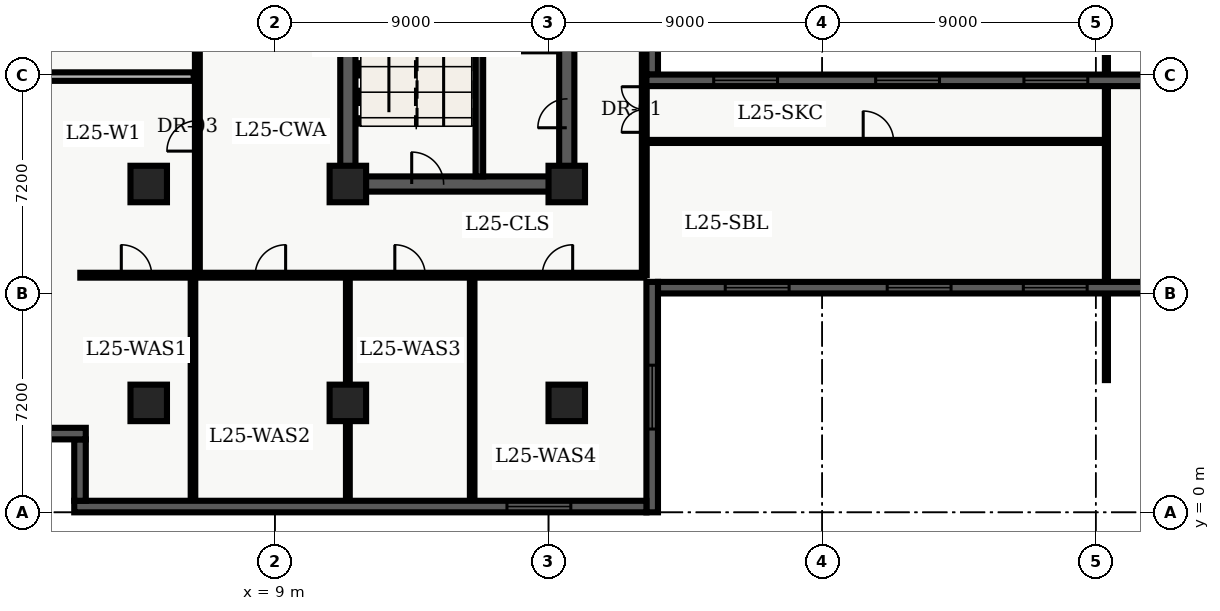
"""IFC4 building model, lengths in metres.
Left out: names, types, materials, properties, quantities, classifications, styles, units other than length and angle.
Written with IfcOpenShell. Run it as: python <this file> out.ifc"""

import sys

from ifc_helpers import new_model, entity, si_unit, converted_unit, direction, frame, origin_with_axes, origin_2d_with_axis, place, context, subcontext, project, spatial, polyline, rectangle, outline, extrude, element, fill, save


model = new_model("IFC4")
c1 = context("Model", 3, precision=1e-05, world=origin_with_axes(), true_north=direction((0.0, 1.0)))
c2 = subcontext(c1, "Body", "Model", "MODEL_VIEW")
j1 = project(units=[si_unit("LENGTHUNIT", "METRE"), converted_unit("PLANEANGLEUNIT", "DEGREE", entity("IfcPlaneAngleMeasure", 0.017), si_unit("PLANEANGLEUNIT", "RADIAN"), dimensions=[0, 0, 0, 0, 0, 0, 0])], contexts=[c1])
p1 = place(None, origin_with_axes())
s1 = spatial("IfcSite", under=j1, at=p1, CompositionType="ELEMENT")
p2 = place(p1, origin_with_axes())
s2 = spatial("IfcBuilding", under=s1, at=p2, CompositionType="ELEMENT")
p3 = place(p2, frame((0.0, 0.0, 104.7), z_axis=(0.0, 0.0, 1.0), x_axis=(1.0, 0.0, 0.0)))
s3 = spatial("IfcBuildingStorey", under=s2, at=p3, CompositionType="ELEMENT", Elevation=104.7)
p4 = place(p3, frame((11.4, 10.8, 0.0), z_axis=(0.0, 0.0, 1.0), x_axis=(0.0, 1.0, 0.0)))
e1 = element("IfcWall", 1, at=p4, inside=s3, PredefinedType="SHEAR", context=c2, shape_type="SweptSolid", body=[
    extrude(outline(polyline([(0.0, -0.25), (27.0, -0.25), (27.0, 0.25), (0.0, 0.25), (0.0, -0.25)])), origin_with_axes(), (0.0, 0.0, 1.0), 3.66),
])
p5 = place(p3, frame((11.4, 10.8, 0.0), z_axis=(0.0, 0.0, 1.0), x_axis=(1.0, 0.0, 0.0)))
e2 = element("IfcWall", 2, at=p5, inside=s3, PredefinedType="SHEAR", context=c2, shape_type="SweptSolid", body=[
    extrude(outline(polyline([(0.0, -0.25), (7.2, -0.25), (7.2, 0.25), (0.0, 0.25), (0.0, -0.25)])), origin_with_axes(), (0.0, 0.0, 1.0), 3.66),
])
p6 = place(p5, frame((2.625, 0.0, 0.0), z_axis=(0.0, 0.0, 1.0), x_axis=(1.0, 0.0, 0.0)))
e3 = element("IfcOpeningElement", 3, at=p6, cuts=e2, PredefinedType="OPENING", context=c2, shape_type="SweptSolid", body=[
    extrude(rectangle(XDim=1.05, YDim=0.52, at=origin_2d_with_axis()), origin_with_axes(), (0.0, 0.0, 1.0), 2.15),
])
p7 = place(p3, frame((18.6, 10.8, 0.0), z_axis=(0.0, 0.0, 1.0), x_axis=(0.0, 1.0, 0.0)))
e4 = element("IfcWall", 4, at=p7, inside=s3, PredefinedType="SHEAR", context=c2, shape_type="SweptSolid", body=[
    extrude(outline(polyline([(0.0, -0.25), (13.5, -0.25), (13.5, 0.25), (0.0, 0.25), (0.0, -0.25)])), origin_with_axes(), (0.0, 0.0, 1.0), 3.66),
])
p8 = place(p7, frame((11.125, 0.0, 0.0), z_axis=(0.0, 0.0, 1.0), x_axis=(1.0, 0.0, 0.0)))
e5 = element("IfcOpeningElement", 5, at=p8, cuts=e4, PredefinedType="OPENING", context=c2, shape_type="SweptSolid", body=[
    extrude(rectangle(XDim=1.05, YDim=0.52, at=origin_2d_with_axis()), origin_with_axes(), (0.0, 0.0, 1.0), 2.15),
])
p9 = place(p7, frame((2.325, 0.0, 0.0), z_axis=(0.0, 0.0, 1.0), x_axis=(1.0, 0.0, 0.0)))
e6 = element("IfcOpeningElement", 6, at=p9, cuts=e4, PredefinedType="OPENING", context=c2, shape_type="SweptSolid", body=[
    extrude(rectangle(XDim=0.95, YDim=0.52, at=origin_2d_with_axis()), origin_with_axes(), (0.0, 0.0, 1.0), 2.15),
])
p10 = place(p3, frame((15.725, 11.05, 0.0), z_axis=(0.0, 0.0, 1.0), x_axis=(0.0, 1.0, 0.0)))
e7 = element("IfcWall", 7, at=p10, inside=s3, PredefinedType="SHEAR", context=c2, shape_type="SweptSolid", body=[
    extrude(outline(polyline([(0.0, -0.125), (8.65, -0.125), (8.65, 0.125), (0.0, 0.125), (0.0, -0.125)])), origin_with_axes(), (0.0, 0.0, 1.0), 3.66),
])
for number, where, z_axis, x_axis in (
    (8, (11.4, 3.6, 0.0), (0.0, 0.0, 1.0), (1.0, 0.0, 0.0)),
    (9, (11.4, 10.8, 0.0), (0.0, 0.0, 1.0), (1.0, 0.0, 0.0)),
    (10, (18.6, 3.6, 0.0), (0.0, 0.0, 1.0), (1.0, 0.0, 0.0)),
    (11, (18.6, 10.8, 0.0), (0.0, 0.0, 1.0), (1.0, 0.0, 0.0)),
    (12, (4.85, 3.6, 0.0), (0.0, 0.0, 1.0), (1.0, 0.0, 0.0)),
    (13, (4.85, 10.8, 0.0), (0.0, 0.0, 1.0), (1.0, 0.0, 0.0)),
):
    element("IfcColumn", number, at=place(p3, frame(where, z_axis=z_axis, x_axis=x_axis)), inside=s3, PredefinedType="COLUMN", context=c2, shape_type="SweptSolid", body=[
        extrude(rectangle(XDim=1.2, YDim=1.2, at=origin_2d_with_axis()), origin_with_axes(), (0.0, 0.0, 1.0), 3.9),
    ])
p11 = place(p3, frame((2.6, 7.8, 0.0), z_axis=(0.0, 0.0, 1.0), x_axis=(1.0, 0.0, 0.0)))
e14 = element("IfcWall", 14, at=p11, inside=s3, PredefinedType="PARTITIONING", context=c2, shape_type="SweptSolid", body=[
    extrude(outline(polyline([(0.0, -0.08), (18.55, -0.08), (18.55, 0.08), (0.0, 0.08), (0.0, -0.08)])), origin_with_axes(), (0.0, 0.0, 1.0), 2.7),
])
p12 = place(p11, frame((1.848, 0.0, 0.0), z_axis=(0.0, 0.0, 1.0), x_axis=(1.0, 0.0, 0.0)))
e15 = element("IfcOpeningElement", 15, at=p12, cuts=e14, PredefinedType="OPENING", context=c2, shape_type="SweptSolid", body=[
    extrude(rectangle(XDim=1.0, YDim=0.18, at=origin_2d_with_axis()), origin_with_axes(), (0.0, 0.0, 1.0), 2.15),
])
p13 = place(p11, frame((6.253, 0.0, 0.0), z_axis=(0.0, 0.0, 1.0), x_axis=(1.0, 0.0, 0.0)))
e16 = element("IfcOpeningElement", 16, at=p13, cuts=e14, PredefinedType="OPENING", context=c2, shape_type="SweptSolid", body=[
    extrude(rectangle(XDim=1.0, YDim=0.18, at=origin_2d_with_axis()), origin_with_axes(), (0.0, 0.0, 1.0), 2.15),
])
p14 = place(p11, frame((10.845, 0.0, 0.0), z_axis=(0.0, 0.0, 1.0), x_axis=(1.0, 0.0, 0.0)))
e17 = element("IfcOpeningElement", 17, at=p14, cuts=e14, PredefinedType="OPENING", context=c2, shape_type="SweptSolid", body=[
    extrude(rectangle(XDim=1.0, YDim=0.18, at=origin_2d_with_axis()), origin_with_axes(), (0.0, 0.0, 1.0), 2.15),
])
p15 = place(p11, frame((15.694, 0.0, 0.0), z_axis=(0.0, 0.0, 1.0), x_axis=(1.0, 0.0, 0.0)))
e18 = element("IfcOpeningElement", 18, at=p15, cuts=e14, PredefinedType="OPENING", context=c2, shape_type="SweptSolid", body=[
    extrude(rectangle(XDim=1.0, YDim=0.18, at=origin_2d_with_axis()), origin_with_axes(), (0.0, 0.0, 1.0), 2.15),
])
p16 = place(p3, frame((21.15, 7.8, 0.0), z_axis=(0.0, 0.0, 1.0), x_axis=(0.0, 1.0, 0.0)))
e19 = element("IfcWall", 19, at=p16, inside=s3, PredefinedType="PARTITIONING", context=c2, shape_type="SweptSolid", body=[
    extrude(outline(polyline([(0.0, -0.08), (32.7, -0.08), (32.7, 0.08), (0.0, 0.08), (0.0, -0.08)])), origin_with_axes(), (0.0, 0.0, 1.0), 2.7),
])
p17 = place(p16, frame((5.45, 0.0, 0.0), z_axis=(0.0, 0.0, 1.0), x_axis=(1.0, 0.0, 0.0)))
e20 = element("IfcOpeningElement", 20, at=p17, cuts=e19, PredefinedType="OPENING", context=c2, shape_type="SweptSolid", body=[
    extrude(rectangle(XDim=1.5, YDim=0.18, at=origin_2d_with_axis()), origin_with_axes(), (0.0, 0.0, 1.0), 2.2),
])
p18 = place(p3, frame((6.45, 7.8, 0.0), z_axis=(0.0, 0.0, 1.0), x_axis=(0.0, 1.0, 0.0)))
e21 = element("IfcWall", 21, at=p18, inside=s3, PredefinedType="PARTITIONING", context=c2, shape_type="SweptSolid", body=[
    extrude(outline(polyline([(0.0, -0.08), (32.7, -0.08), (32.7, 0.08), (0.0, 0.08), (0.0, -0.08)])), origin_with_axes(), (0.0, 0.0, 1.0), 2.7),
])
p19 = place(p18, frame((4.582, 0.0, 0.0), z_axis=(0.0, 0.0, 1.0), x_axis=(1.0, 0.0, 0.0)))
e22 = element("IfcOpeningElement", 22, at=p19, cuts=e21, PredefinedType="OPENING", context=c2, shape_type="SweptSolid", body=[
    extrude(rectangle(XDim=1.0, YDim=0.18, at=origin_2d_with_axis()), origin_with_axes(), (0.0, 0.0, 1.0), 2.15),
])
p20 = place(p18, frame((10.304, 0.0, 0.0), z_axis=(0.0, 0.0, 1.0), x_axis=(1.0, 0.0, 0.0)))
e23 = element("IfcOpeningElement", 23, at=p20, cuts=e21, PredefinedType="OPENING", context=c2, shape_type="SweptSolid", body=[
    extrude(rectangle(XDim=1.0, YDim=0.18, at=origin_2d_with_axis()), origin_with_axes(), (0.0, 0.0, 1.0), 2.15),
])
p21 = place(p18, frame((18.512, 0.0, 0.0), z_axis=(0.0, 0.0, 1.0), x_axis=(1.0, 0.0, 0.0)))
e24 = element("IfcOpeningElement", 24, at=p21, cuts=e21, PredefinedType="OPENING", context=c2, shape_type="SweptSolid", body=[
    extrude(rectangle(XDim=1.0, YDim=0.18, at=origin_2d_with_axis()), origin_with_axes(), (0.0, 0.0, 1.0), 2.15),
])
p22 = place(p18, frame((25.142, 0.0, 0.0), z_axis=(0.0, 0.0, 1.0), x_axis=(1.0, 0.0, 0.0)))
e25 = element("IfcOpeningElement", 25, at=p22, cuts=e21, PredefinedType="OPENING", context=c2, shape_type="SweptSolid", body=[
    extrude(rectangle(XDim=1.0, YDim=0.18, at=origin_2d_with_axis()), origin_with_axes(), (0.0, 0.0, 1.0), 2.15),
])
p23 = place(p18, frame((31.602, 0.0, 0.0), z_axis=(0.0, 0.0, 1.0), x_axis=(1.0, 0.0, 0.0)))
e26 = element("IfcOpeningElement", 26, at=p23, cuts=e21, PredefinedType="OPENING", context=c2, shape_type="SweptSolid", body=[
    extrude(rectangle(XDim=1.0, YDim=0.18, at=origin_2d_with_axis()), origin_with_axes(), (0.0, 0.0, 1.0), 2.15),
])
p24 = place(p3, frame((0.375, 14.333, 0.0), z_axis=(0.0, 0.0, 1.0), x_axis=(1.0, 0.0, 0.0)))
e27 = element("IfcWall", 27, at=p24, inside=s3, PredefinedType="PARTITIONING", context=c2, shape_type="SweptSolid", body=[
    extrude(outline(polyline([(0.0, -0.14), (5.955, -0.14), (5.955, 0.14), (0.0, 0.14), (0.0, -0.14)])), origin_with_axes(), (0.0, 0.0, 1.0), 2.7),
])
p25 = place(p3, frame((6.306, 0.36, 0.0), z_axis=(0.0, 0.0, 1.0), x_axis=(0.0, 1.0, 0.0)))
e28 = element("IfcWall", 28, at=p25, inside=s3, PredefinedType="PARTITIONING", context=c2, shape_type="SweptSolid", body=[
    extrude(outline(polyline([(0.0, -0.075), (7.34, -0.075), (7.34, 0.075), (0.0, 0.075), (0.0, -0.075)])), origin_with_axes(), (0.0, 0.0, 1.0), 2.7),
])
p26 = place(p3, frame((11.4, 0.36, 0.0), z_axis=(0.0, 0.0, 1.0), x_axis=(0.0, 1.0, 0.0)))
e29 = element("IfcWall", 29, at=p26, inside=s3, PredefinedType="PARTITIONING", context=c2, shape_type="SweptSolid", body=[
    extrude(outline(polyline([(0.0, -0.062), (7.34, -0.062), (7.34, 0.062), (0.0, 0.062), (0.0, -0.062)])), origin_with_axes(), (0.0, 0.0, 1.0), 2.7),
])
p27 = place(p3, frame((15.489, 0.36, 0.0), z_axis=(0.0, 0.0, 1.0), x_axis=(0.0, 1.0, 0.0)))
e30 = element("IfcWall", 30, at=p27, inside=s3, PredefinedType="PARTITIONING", context=c2, shape_type="SweptSolid", body=[
    extrude(outline(polyline([(0.0, -0.075), (7.34, -0.075), (7.34, 0.075), (0.0, 0.075), (0.0, -0.075)])), origin_with_axes(), (0.0, 0.0, 1.0), 2.7),
])
p28 = place(p3, frame((21.15, 12.2, 0.0), z_axis=(0.0, 0.0, 1.0), x_axis=(1.0, 0.0, 0.0)))
e31 = element("IfcWall", 31, at=p28, inside=s3, PredefinedType="PARTITIONING", context=c2, shape_type="SweptSolid", body=[
    extrude(outline(polyline([(0.0, -0.05), (15.2, -0.05), (15.2, 0.05), (0.0, 0.05), (0.0, -0.05)])), origin_with_axes(), (0.0, 0.0, 1.0), 2.7),
])
p29 = place(p28, frame((7.7, 0.0, 0.0), z_axis=(0.0, 0.0, 1.0), x_axis=(1.0, 0.0, 0.0)))
e32 = element("IfcOpeningElement", 32, at=p29, cuts=e31, PredefinedType="OPENING", context=c2, shape_type="SweptSolid", body=[
    extrude(rectangle(XDim=1.0, YDim=0.12, at=origin_2d_with_axis()), origin_with_axes(), (0.0, 0.0, 1.0), 2.15),
])
p30 = place(p3, frame((36.35, 4.35, 0.0), z_axis=(0.0, 0.0, 1.0), x_axis=(0.0, 1.0, 0.0)))
e33 = element("IfcWall", 33, at=p30, inside=s3, PredefinedType="PARTITIONING", context=c2, shape_type="SweptSolid", body=[
    extrude(outline(polyline([(0.0, -0.05), (22.2, -0.05), (22.2, 0.05), (0.0, 0.05), (0.0, -0.05)])), origin_with_axes(), (0.0, 0.0, 1.0), 2.7),
])
p31 = place(p3, frame((38.78, 7.39, 0.0), z_axis=(0.0, 0.0, 1.0), x_axis=(-1.0, 0.0, 0.0)))
e34 = element("IfcWall", 34, at=p31, inside=s3, PredefinedType="SOLIDWALL", context=c2, shape_type="SweptSolid", body=[
    extrude(outline(polyline([(0.0, -0.19), (17.18, -0.19), (17.18, 0.19), (0.0, 0.19), (0.0, -0.19)])), origin_with_axes(), (0.0, 0.0, 1.0), 3.66),
])
p32 = place(p31, frame((4.113, 0.0, 0.45), z_axis=(0.0, 0.0, 1.0), x_axis=(1.0, 0.0, 0.0)))
e35 = element("IfcOpeningElement", 35, at=p32, cuts=e34, PredefinedType="OPENING", context=c2, shape_type="SweptSolid", body=[
    extrude(rectangle(XDim=2.1, YDim=0.4, at=origin_2d_with_axis()), origin_with_axes(), (0.0, 0.0, 1.0), 2.2),
])
p33 = place(p31, frame((8.59, 0.0, 0.45), z_axis=(0.0, 0.0, 1.0), x_axis=(1.0, 0.0, 0.0)))
e36 = element("IfcOpeningElement", 36, at=p33, cuts=e34, PredefinedType="OPENING", context=c2, shape_type="SweptSolid", body=[
    extrude(rectangle(XDim=2.1, YDim=0.4, at=origin_2d_with_axis()), origin_with_axes(), (0.0, 0.0, 1.0), 2.2),
])
p34 = place(p31, frame((13.917, 0.0, 0.45), z_axis=(0.0, 0.0, 1.0), x_axis=(1.0, 0.0, 0.0)))
e37 = element("IfcOpeningElement", 37, at=p34, cuts=e34, PredefinedType="OPENING", context=c2, shape_type="SweptSolid", body=[
    extrude(rectangle(XDim=2.1, YDim=0.4, at=origin_2d_with_axis()), origin_with_axes(), (0.0, 0.0, 1.0), 2.2),
])
p35 = place(p3, frame((21.41, 7.58, 0.0), z_axis=(0.0, 0.0, 1.0), x_axis=(0.0, -1.0, 0.0)))
e38 = element("IfcWall", 38, at=p35, inside=s3, PredefinedType="SOLIDWALL", context=c2, shape_type="SweptSolid", body=[
    extrude(outline(polyline([(0.0, -0.19), (7.58, -0.19), (7.58, 0.19), (0.0, 0.19), (0.0, -0.19)])), origin_with_axes(), (0.0, 0.0, 1.0), 3.66),
])
p36 = place(p35, frame((3.79, 0.0, 0.45), z_axis=(0.0, 0.0, 1.0), x_axis=(1.0, 0.0, 0.0)))
e39 = element("IfcOpeningElement", 39, at=p36, cuts=e38, PredefinedType="OPENING", context=c2, shape_type="SweptSolid", body=[
    extrude(rectangle(XDim=2.1, YDim=0.4, at=origin_2d_with_axis()), origin_with_axes(), (0.0, 0.0, 1.0), 2.2),
])
p37 = place(p3, frame((21.22, 0.19, 0.0), z_axis=(0.0, 0.0, 1.0), x_axis=(-1.0, 0.0, 0.0)))
e40 = element("IfcWall", 40, at=p37, inside=s3, PredefinedType="SOLIDWALL", context=c2, shape_type="SweptSolid", body=[
    extrude(outline(polyline([(0.0, -0.19), (18.82, -0.19), (18.82, 0.19), (0.0, 0.19), (0.0, -0.19)])), origin_with_axes(), (0.0, 0.0, 1.0), 3.66),
])
p38 = place(p37, frame((3.537, 0.0, 0.45), z_axis=(0.0, 0.0, 1.0), x_axis=(1.0, 0.0, 0.0)))
e41 = element("IfcOpeningElement", 41, at=p38, cuts=e40, PredefinedType="OPENING", context=c2, shape_type="SweptSolid", body=[
    extrude(rectangle(XDim=2.1, YDim=0.4, at=origin_2d_with_axis()), origin_with_axes(), (0.0, 0.0, 1.0), 2.2),
])
p39 = place(p3, frame((2.59, 0.38, 0.0), z_axis=(0.0, 0.0, 1.0), x_axis=(0.0, 1.0, 0.0)))
e42 = element("IfcWall", 42, at=p39, inside=s3, PredefinedType="SOLIDWALL", context=c2, shape_type="SweptSolid", body=[
    extrude(outline(polyline([(0.0, -0.19), (2.02, -0.19), (2.02, 0.19), (0.0, 0.19), (0.0, -0.19)])), origin_with_axes(), (0.0, 0.0, 1.0), 3.66),
])
p40 = place(p3, frame((2.78, 2.59, 0.0), z_axis=(0.0, 0.0, 1.0), x_axis=(-1.0, 0.0, 0.0)))
e43 = element("IfcWall", 43, at=p40, inside=s3, PredefinedType="SOLIDWALL", context=c2, shape_type="SweptSolid", body=[
    extrude(outline(polyline([(0.0, -0.19), (2.78, -0.19), (2.78, 0.19), (0.0, 0.19), (0.0, -0.19)])), origin_with_axes(), (0.0, 0.0, 1.0), 3.66),
])
p41 = place(p3, frame((21.41, 31.65, 0.0), z_axis=(0.0, 0.0, 1.0), x_axis=(0.0, -1.0, 0.0)))
e44 = element("IfcWall", 44, at=p41, inside=s3, PredefinedType="SOLIDWALL", context=c2, shape_type="SweptSolid", body=[
    extrude(outline(polyline([(0.0, -0.19), (17.25, -0.19), (17.25, 0.19), (0.0, 0.19), (0.0, -0.19)])), origin_with_axes(), (0.0, 0.0, 1.0), 3.66),
])
p42 = place(p3, frame((21.22, 14.21, 0.0), z_axis=(0.0, 0.0, 1.0), x_axis=(1.0, 0.0, 0.0)))
e45 = element("IfcWall", 45, at=p42, inside=s3, PredefinedType="SOLIDWALL", context=c2, shape_type="SweptSolid", body=[
    extrude(outline(polyline([(0.0, -0.19), (17.18, -0.19), (17.18, 0.19), (0.0, 0.19), (0.0, -0.19)])), origin_with_axes(), (0.0, 0.0, 1.0), 3.66),
])
p43 = place(p42, frame((3.263, 0.0, 0.45), z_axis=(0.0, 0.0, 1.0), x_axis=(1.0, 0.0, 0.0)))
e46 = element("IfcOpeningElement", 46, at=p43, cuts=e45, PredefinedType="OPENING", context=c2, shape_type="SweptSolid", body=[
    extrude(rectangle(XDim=2.1, YDim=0.4, at=origin_2d_with_axis()), origin_with_axes(), (0.0, 0.0, 1.0), 2.2),
])
p44 = place(p42, frame((8.59, 0.0, 0.45), z_axis=(0.0, 0.0, 1.0), x_axis=(1.0, 0.0, 0.0)))
e47 = element("IfcOpeningElement", 47, at=p44, cuts=e45, PredefinedType="OPENING", context=c2, shape_type="SweptSolid", body=[
    extrude(rectangle(XDim=2.1, YDim=0.4, at=origin_2d_with_axis()), origin_with_axes(), (0.0, 0.0, 1.0), 2.2),
])
p45 = place(p42, frame((13.467, 0.0, 0.45), z_axis=(0.0, 0.0, 1.0), x_axis=(1.0, 0.0, 0.0)))
e48 = element("IfcOpeningElement", 48, at=p45, cuts=e45, PredefinedType="OPENING", context=c2, shape_type="SweptSolid", body=[
    extrude(rectangle(XDim=2.1, YDim=0.4, at=origin_2d_with_axis()), origin_with_axes(), (0.0, 0.0, 1.0), 2.2),
])
p46 = place(p5, frame((2.625, 0.0, 0.0), z_axis=(0.0, 0.0, 1.0), x_axis=(1.0, 0.0, 0.0)))
e49 = element("IfcDoor", 49, at=p46, inside=s3, OperationType="SINGLE_SWING_LEFT", PredefinedType="DOOR", context=c2, shape_type="SweptSolid", body=[
    extrude(rectangle(XDim=1.05, YDim=0.09, at=origin_2d_with_axis()), origin_with_axes(), (0.0, 0.0, 1.0), 2.15),
])
fill(e3, e49)
p47 = place(p7, frame((2.325, 0.0, 0.0), z_axis=(0.0, 0.0, 1.0), x_axis=(1.0, 0.0, 0.0)))
e50 = element("IfcDoor", 50, at=p47, inside=s3, OperationType="SINGLE_SWING_LEFT", PredefinedType="DOOR", context=c2, shape_type="SweptSolid", body=[
    extrude(rectangle(XDim=0.95, YDim=0.09, at=origin_2d_with_axis()), origin_with_axes(), (0.0, 0.0, 1.0), 2.15),
])
fill(e6, e50)
p48 = place(p18, frame((4.582, 0.0, 0.0), z_axis=(0.0, 0.0, 1.0), x_axis=(1.0, 0.0, 0.0)))
e51 = element("IfcDoor", 51, at=p48, inside=s3, OperationType="SINGLE_SWING_LEFT", PredefinedType="DOOR", context=c2, shape_type="SweptSolid", body=[
    extrude(rectangle(XDim=1.0, YDim=0.09, at=origin_2d_with_axis()), origin_with_axes(), (0.0, 0.0, 1.0), 2.15),
])
fill(e22, e51)
p49 = place(p11, frame((1.848, 0.0, 0.0), z_axis=(0.0, 0.0, 1.0), x_axis=(1.0, 0.0, 0.0)))
e52 = element("IfcDoor", 52, at=p49, inside=s3, OperationType="SINGLE_SWING_LEFT", PredefinedType="DOOR", context=c2, shape_type="SweptSolid", body=[
    extrude(rectangle(XDim=1.0, YDim=0.09, at=origin_2d_with_axis()), origin_with_axes(), (0.0, 0.0, 1.0), 2.15),
])
fill(e15, e52)
p50 = place(p11, frame((6.253, 0.0, 0.0), z_axis=(0.0, 0.0, 1.0), x_axis=(1.0, 0.0, 0.0)))
e53 = element("IfcDoor", 53, at=p50, inside=s3, OperationType="SINGLE_SWING_RIGHT", PredefinedType="DOOR", context=c2, shape_type="SweptSolid", body=[
    extrude(rectangle(XDim=1.0, YDim=0.09, at=origin_2d_with_axis()), origin_with_axes(), (0.0, 0.0, 1.0), 2.15),
])
fill(e16, e53)
p51 = place(p11, frame((10.845, 0.0, 0.0), z_axis=(0.0, 0.0, 1.0), x_axis=(1.0, 0.0, 0.0)))
e54 = element("IfcDoor", 54, at=p51, inside=s3, OperationType="SINGLE_SWING_LEFT", PredefinedType="DOOR", context=c2, shape_type="SweptSolid", body=[
    extrude(rectangle(XDim=1.0, YDim=0.09, at=origin_2d_with_axis()), origin_with_axes(), (0.0, 0.0, 1.0), 2.15),
])
fill(e17, e54)
p52 = place(p11, frame((15.694, 0.0, 0.0), z_axis=(0.0, 0.0, 1.0), x_axis=(1.0, 0.0, 0.0)))
e55 = element("IfcDoor", 55, at=p52, inside=s3, OperationType="SINGLE_SWING_RIGHT", PredefinedType="DOOR", context=c2, shape_type="SweptSolid", body=[
    extrude(rectangle(XDim=1.0, YDim=0.09, at=origin_2d_with_axis()), origin_with_axes(), (0.0, 0.0, 1.0), 2.15),
])
fill(e18, e55)
p53 = place(p16, frame((5.45, 0.0, 0.0), z_axis=(0.0, 0.0, 1.0), x_axis=(1.0, 0.0, 0.0)))
e56 = element("IfcDoor", 56, at=p53, inside=s3, OperationType="DOUBLE_DOOR_SINGLE_SWING", PredefinedType="DOOR", context=c2, shape_type="SweptSolid", body=[
    extrude(rectangle(XDim=1.5, YDim=0.09, at=origin_2d_with_axis()), origin_with_axes(), (0.0, 0.0, 1.0), 2.2),
])
fill(e20, e56)
p54 = place(p28, frame((7.7, 0.0, 0.0), z_axis=(0.0, 0.0, 1.0), x_axis=(1.0, 0.0, 0.0)))
e57 = element("IfcDoor", 57, at=p54, inside=s3, OperationType="SINGLE_SWING_LEFT", PredefinedType="DOOR", context=c2, shape_type="SweptSolid", body=[
    extrude(rectangle(XDim=1.0, YDim=0.06, at=origin_2d_with_axis()), origin_with_axes(), (0.0, 0.0, 1.0), 2.15),
])
fill(e32, e57)
p55 = place(p31, frame((4.113, 0.0, 0.45), z_axis=(0.0, 0.0, 1.0), x_axis=(1.0, 0.0, 0.0)))
e58 = element("IfcWindow", 58, at=p55, inside=s3, PredefinedType="WINDOW", context=c2, shape_type="SweptSolid", body=[
    extrude(rectangle(XDim=2.1, YDim=0.09, at=origin_2d_with_axis()), origin_with_axes(), (0.0, 0.0, 1.0), 2.2),
])
fill(e35, e58)
p56 = place(p31, frame((8.59, 0.0, 0.45), z_axis=(0.0, 0.0, 1.0), x_axis=(1.0, 0.0, 0.0)))
e59 = element("IfcWindow", 59, at=p56, inside=s3, PredefinedType="WINDOW", context=c2, shape_type="SweptSolid", body=[
    extrude(rectangle(XDim=2.1, YDim=0.09, at=origin_2d_with_axis()), origin_with_axes(), (0.0, 0.0, 1.0), 2.2),
])
fill(e36, e59)
p57 = place(p31, frame((13.917, 0.0, 0.45), z_axis=(0.0, 0.0, 1.0), x_axis=(1.0, 0.0, 0.0)))
e60 = element("IfcWindow", 60, at=p57, inside=s3, PredefinedType="WINDOW", context=c2, shape_type="SweptSolid", body=[
    extrude(rectangle(XDim=2.1, YDim=0.09, at=origin_2d_with_axis()), origin_with_axes(), (0.0, 0.0, 1.0), 2.2),
])
fill(e37, e60)
p58 = place(p35, frame((3.79, 0.0, 0.45), z_axis=(0.0, 0.0, 1.0), x_axis=(1.0, 0.0, 0.0)))
e61 = element("IfcWindow", 61, at=p58, inside=s3, PredefinedType="WINDOW", context=c2, shape_type="SweptSolid", body=[
    extrude(rectangle(XDim=2.1, YDim=0.09, at=origin_2d_with_axis()), origin_with_axes(), (0.0, 0.0, 1.0), 2.2),
])
fill(e39, e61)
p59 = place(p37, frame((3.537, 0.0, 0.45), z_axis=(0.0, 0.0, 1.0), x_axis=(1.0, 0.0, 0.0)))
e62 = element("IfcWindow", 62, at=p59, inside=s3, PredefinedType="WINDOW", context=c2, shape_type="SweptSolid", body=[
    extrude(rectangle(XDim=2.1, YDim=0.09, at=origin_2d_with_axis()), origin_with_axes(), (0.0, 0.0, 1.0), 2.2),
])
fill(e41, e62)
p60 = place(p42, frame((3.263, 0.0, 0.45), z_axis=(0.0, 0.0, 1.0), x_axis=(1.0, 0.0, 0.0)))
e63 = element("IfcWindow", 63, at=p60, inside=s3, PredefinedType="WINDOW", context=c2, shape_type="SweptSolid", body=[
    extrude(rectangle(XDim=2.1, YDim=0.09, at=origin_2d_with_axis()), origin_with_axes(), (0.0, 0.0, 1.0), 2.2),
])
fill(e46, e63)
p61 = place(p42, frame((8.59, 0.0, 0.45), z_axis=(0.0, 0.0, 1.0), x_axis=(1.0, 0.0, 0.0)))
e64 = element("IfcWindow", 64, at=p61, inside=s3, PredefinedType="WINDOW", context=c2, shape_type="SweptSolid", body=[
    extrude(rectangle(XDim=2.1, YDim=0.09, at=origin_2d_with_axis()), origin_with_axes(), (0.0, 0.0, 1.0), 2.2),
])
fill(e47, e64)
p62 = place(p42, frame((13.467, 0.0, 0.45), z_axis=(0.0, 0.0, 1.0), x_axis=(1.0, 0.0, 0.0)))
e65 = element("IfcWindow", 65, at=p62, inside=s3, PredefinedType="WINDOW", context=c2, shape_type="SweptSolid", body=[
    extrude(rectangle(XDim=2.1, YDim=0.09, at=origin_2d_with_axis()), origin_with_axes(), (0.0, 0.0, 1.0), 2.2),
])
fill(e48, e65)
save(model, sys.argv[1])
